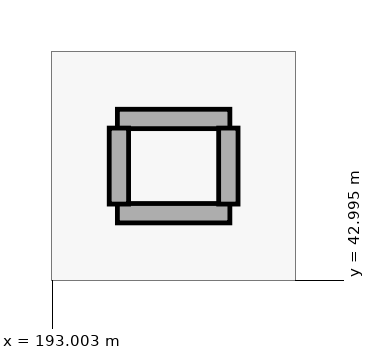
"""IFC4 building model, lengths in metres.
Left out: names, types, materials, properties, quantities, classifications, styles, units other than length and angle.
Written with IfcOpenShell. Run it as: python <this file> out.ifc"""

import sys

from ifc_helpers import new_model, si_unit, direction, frame, frame_2d, origin, place, context, subcontext, project, spatial, rectangle, extrude, element, save


model = new_model("IFC4")
c1 = context("Model", 3, precision=1e-05, world=origin(), true_north=direction((0.0, 1.0)))
c2 = subcontext(c1, "Body", "Model", "MODEL_VIEW")
j1 = project(units=[si_unit("LENGTHUNIT", "METRE"), si_unit("PLANEANGLEUNIT", "RADIAN")], contexts=[c1])
p1 = place(None, origin())
s1 = spatial("IfcSite", under=j1, at=p1, CompositionType="ELEMENT")
p2 = place(p1, origin())
s2 = spatial("IfcBuilding", under=s1, at=p2, CompositionType="ELEMENT")
p3 = place(p2, frame((0.0, 0.0, 10.5)))
s3 = spatial("IfcBuildingStorey", under=s2, at=p3, CompositionType="ELEMENT", Elevation=10.5)
for number, where, z_axis, x_axis in (
    (1, (193.86, 45.12, 0.0), (0.0, 0.0, 1.0), (1.0, 0.0, 0.0)),
    (2, (193.86, 43.88, 0.0), (0.0, 0.0, 1.0), (1.0, 0.0, 0.0)),
):
    element("IfcWall", number, at=place(p3, frame(where, z_axis=z_axis, x_axis=x_axis)), inside=s3, PredefinedType="PARTITIONING", context=c2, shape_type="SweptSolid", body=[
        extrude(rectangle(XDim=1.48, YDim=0.255, at=frame_2d((0.74, 0.0))), origin(), (0.0, 0.0, 1.0), 4.72),
    ])
for number, where, z_axis, x_axis in (
    (3, (193.88, 44.0, 0.0), (0.0, 0.0, 1.0), (0.0, 1.0, 0.0)),
    (4, (195.32, 44.0, 0.0), (0.0, 0.0, 1.0), (0.0, 1.0, 0.0)),
):
    element("IfcWall", number, at=place(p3, frame(where, z_axis=z_axis, x_axis=x_axis)), inside=s3, PredefinedType="PARTITIONING", context=c2, shape_type="SweptSolid", body=[
        extrude(rectangle(XDim=1.0, YDim=0.255, at=frame_2d((0.5, 0.0))), origin(), (0.0, 0.0, 1.0), 4.72),
    ])
save(model, sys.argv[1])
